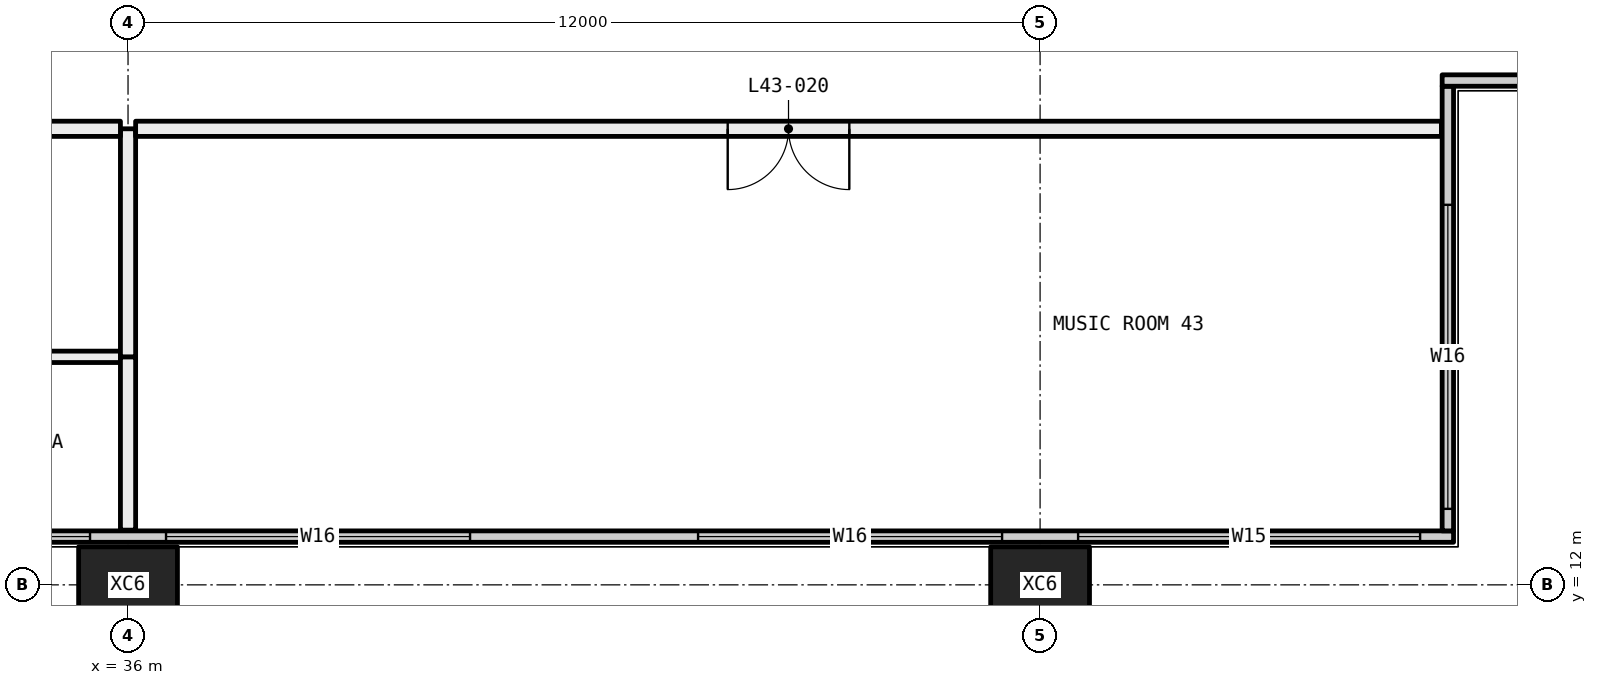
"""IFC4 building model, lengths in metres.
Left out: names, types, materials, properties, quantities, classifications, styles, units other than length and angle.
Written with IfcOpenShell. Run it as: python <this file> out.ifc"""

import sys

from ifc_helpers import new_model, si_unit, direction, frame, frame_2d, origin, origin_2d, place, context, subcontext, project, spatial, rectangle, hollow_rectangle, extrude, element, fill, save


model = new_model("IFC4")
c1 = context("Model", 3, precision=1e-05, world=origin(), true_north=direction((0.0, 1.0)))
c2 = subcontext(c1, "Body", "Model", "MODEL_VIEW")
j1 = project(units=[si_unit("LENGTHUNIT", "METRE"), si_unit("PLANEANGLEUNIT", "RADIAN")], contexts=[c1])
p1 = place(None, origin())
s1 = spatial("IfcSite", under=j1, at=p1, CompositionType="ELEMENT")
p2 = place(p1, origin())
s2 = spatial("IfcBuilding", under=s1, at=p2, CompositionType="ELEMENT")
p3 = place(p2, frame((0.0, 0.0, 165.15)))
s3 = spatial("IfcBuildingStorey", under=s2, at=p3, CompositionType="ELEMENT", Elevation=165.15)
for number, where, z_axis, x_axis in (
    (1, (36.0, 12.0, -0.4), (0.0, 0.0, 1.0), (1.0, 0.0, 0.0)),
    (2, (48.0, 12.0, -0.4), (0.0, 0.0, 1.0), (1.0, 0.0, 0.0)),
):
    element("IfcColumn", number, at=place(p3, frame(where, z_axis=z_axis, x_axis=x_axis)), inside=s3, PredefinedType="COLUMN", context=c2, shape_type="SweptSolid", body=[
        extrude(hollow_rectangle(XDim=1.3, YDim=1.0, WallThickness=0.05, at=origin_2d()), origin(), (0.0, 0.0, 1.0), 3.45),
    ])
p4 = place(p3, frame((6.56, 12.635, 0.0), z_axis=(0.0, 0.0, 1.0), x_axis=(1.0, 0.0, 0.0)))
e3 = element("IfcWall", 3, at=p4, inside=s3, PredefinedType="ELEMENTEDWALL", context=c2, shape_type="SweptSolid", body=[
    extrude(rectangle(XDim=46.88, YDim=0.15, at=frame_2d((23.44, 0.0))), origin(), (0.0, 0.0, 1.0), 3.05),
])
p5 = place(p4, frame((0.44, 0.0, 0.45)))
e4 = element("IfcOpeningElement", 4, at=p5, cuts=e3, PredefinedType="OPENING", context=c2, shape_type="SweptSolid", body=[
    extrude(rectangle(XDim=4.5, YDim=2.55, at=frame_2d((2.25, 1.275))), frame((0.0, 0.085, 0.0), z_axis=(0.0, -1.0, 0.0), x_axis=(1.0, 0.0, 0.0)), (0.0, 0.0, 1.0), 0.17),
])
p6 = place(p4, frame((5.94, 0.0, 0.45)))
e5 = element("IfcOpeningElement", 5, at=p6, cuts=e3, PredefinedType="OPENING", context=c2, shape_type="SweptSolid", body=[
    extrude(rectangle(XDim=4.0, YDim=2.55, at=frame_2d((2.0, 1.275))), frame((0.0, 0.085, 0.0), z_axis=(0.0, -1.0, 0.0), x_axis=(1.0, 0.0, 0.0)), (0.0, 0.0, 1.0), 0.17),
])
p7 = place(p4, frame((12.94, 0.0, 0.45)))
e6 = element("IfcOpeningElement", 6, at=p7, cuts=e3, PredefinedType="OPENING", context=c2, shape_type="SweptSolid", body=[
    extrude(rectangle(XDim=4.0, YDim=2.55, at=frame_2d((2.0, 1.275))), frame((0.0, 0.085, 0.0), z_axis=(0.0, -1.0, 0.0), x_axis=(1.0, 0.0, 0.0)), (0.0, 0.0, 1.0), 0.17),
])
p8 = place(p4, frame((17.94, 0.0, 0.45)))
e7 = element("IfcOpeningElement", 7, at=p8, cuts=e3, PredefinedType="OPENING", context=c2, shape_type="SweptSolid", body=[
    extrude(rectangle(XDim=4.0, YDim=2.55, at=frame_2d((2.0, 1.275))), frame((0.0, 0.085, 0.0), z_axis=(0.0, -1.0, 0.0), x_axis=(1.0, 0.0, 0.0)), (0.0, 0.0, 1.0), 0.17),
])
p9 = place(p4, frame((24.94, 0.0, 0.45)))
e8 = element("IfcOpeningElement", 8, at=p9, cuts=e3, PredefinedType="OPENING", context=c2, shape_type="SweptSolid", body=[
    extrude(rectangle(XDim=1.0, YDim=2.55, at=frame_2d((0.5, 1.275))), frame((0.0, 0.085, 0.0), z_axis=(0.0, -1.0, 0.0), x_axis=(1.0, 0.0, 0.0)), (0.0, 0.0, 1.0), 0.17),
])
p10 = place(p4, frame((26.94, 0.0, 0.45)))
e9 = element("IfcOpeningElement", 9, at=p10, cuts=e3, PredefinedType="OPENING", context=c2, shape_type="SweptSolid", body=[
    extrude(rectangle(XDim=2.0, YDim=2.55, at=frame_2d((1.0, 1.275))), frame((0.0, 0.085, 0.0), z_axis=(0.0, -1.0, 0.0), x_axis=(1.0, 0.0, 0.0)), (0.0, 0.0, 1.0), 0.17),
])
p11 = place(p4, frame((29.94, 0.0, 0.45)))
e10 = element("IfcOpeningElement", 10, at=p11, cuts=e3, PredefinedType="OPENING", context=c2, shape_type="SweptSolid", body=[
    extrude(rectangle(XDim=4.0, YDim=2.55, at=frame_2d((2.0, 1.275))), frame((0.0, 0.085, 0.0), z_axis=(0.0, -1.0, 0.0), x_axis=(1.0, 0.0, 0.0)), (0.0, 0.0, 1.0), 0.17),
])
p12 = place(p4, frame((36.94, 0.0, 0.45)))
e11 = element("IfcOpeningElement", 11, at=p12, cuts=e3, PredefinedType="OPENING", context=c2, shape_type="SweptSolid", body=[
    extrude(rectangle(XDim=4.0, YDim=2.55, at=frame_2d((2.0, 1.275))), frame((0.0, 0.085, 0.0), z_axis=(0.0, -1.0, 0.0), x_axis=(1.0, 0.0, 0.0)), (0.0, 0.0, 1.0), 0.17),
])
p13 = place(p4, frame((41.94, 0.0, 0.45)))
e12 = element("IfcOpeningElement", 12, at=p13, cuts=e3, PredefinedType="OPENING", context=c2, shape_type="SweptSolid", body=[
    extrude(rectangle(XDim=4.5, YDim=2.55, at=frame_2d((2.25, 1.275))), frame((0.0, 0.085, 0.0), z_axis=(0.0, -1.0, 0.0), x_axis=(1.0, 0.0, 0.0)), (0.0, 0.0, 1.0), 0.17),
])
p14 = place(p3, frame((53.365, 12.71, 0.0), z_axis=(0.0, 0.0, 1.0), x_axis=(0.0, 1.0, 0.0)))
e13 = element("IfcWall", 13, at=p14, inside=s3, PredefinedType="ELEMENTEDWALL", context=c2, shape_type="SweptSolid", body=[
    extrude(rectangle(XDim=5.85, YDim=0.15, at=frame_2d((2.925, 0.0))), origin(), (0.0, 0.0, 1.0), 3.05),
])
p15 = place(p14, frame((0.29, 0.0, 0.45)))
e14 = element("IfcOpeningElement", 14, at=p15, cuts=e13, PredefinedType="OPENING", context=c2, shape_type="SweptSolid", body=[
    extrude(rectangle(XDim=4.0, YDim=2.55, at=frame_2d((2.0, 1.275))), frame((0.0, 0.085, 0.0), z_axis=(0.0, -1.0, 0.0), x_axis=(1.0, 0.0, 0.0)), (0.0, 0.0, 1.0), 0.17),
])
p16 = place(p3, frame((53.29, 18.635, 0.0), z_axis=(0.0, 0.0, 1.0), x_axis=(1.0, 0.0, 0.0)))
e15 = element("IfcWall", 15, at=p16, inside=s3, PredefinedType="ELEMENTEDWALL", context=c2, shape_type="SweptSolid", body=[
    extrude(rectangle(XDim=6.15, YDim=0.15, at=frame_2d((3.075, 0.0))), origin(), (0.0, 0.0, 1.0), 3.05),
])
p17 = place(p16, frame((1.71, 0.0, 0.45)))
e16 = element("IfcOpeningElement", 16, at=p17, cuts=e15, PredefinedType="OPENING", context=c2, shape_type="SweptSolid", body=[
    extrude(rectangle(XDim=4.0, YDim=2.55, at=frame_2d((2.0, 1.275))), frame((0.0, 0.085, 0.0), z_axis=(0.0, -1.0, 0.0), x_axis=(1.0, 0.0, 0.0)), (0.0, 0.0, 1.0), 0.17),
])
p18 = place(p3, frame((35.9, 15.0, 0.0), z_axis=(0.0, 0.0, 1.0), x_axis=(-1.0, 0.0, 0.0)))
e17 = element("IfcWall", 17, at=p18, inside=s3, PredefinedType="PARTITIONING", context=c2, shape_type="SweptSolid", body=[
    extrude(rectangle(XDim=5.825, YDim=0.15, at=frame_2d((2.913, 0.0))), origin(), (0.0, 0.0, 1.0), 3.05),
])
p19 = place(p3, frame((36.0, 12.72, 0.0), z_axis=(0.0, 0.0, 1.0), x_axis=(0.0, 1.0, 0.0)))
e18 = element("IfcWall", 18, at=p19, inside=s3, PredefinedType="PARTITIONING", context=c2, shape_type="SweptSolid", body=[
    extrude(rectangle(XDim=2.28, YDim=0.2, at=frame_2d((1.14, 0.0))), origin(), (0.0, 0.0, 1.0), 2.45),
])
p20 = place(p3, frame((36.0, 15.0, 0.0), z_axis=(0.0, 0.0, 1.0), x_axis=(0.0, 1.0, 0.0)))
e19 = element("IfcWall", 19, at=p20, inside=s3, PredefinedType="PARTITIONING", context=c2, shape_type="SweptSolid", body=[
    extrude(rectangle(XDim=3.0, YDim=0.2, at=frame_2d((1.5, 0.0))), origin(), (0.0, 0.0, 1.0), 2.45),
])
p21 = place(p3, frame((35.9, 18.0, 0.0), z_axis=(0.0, 0.0, 1.0), x_axis=(-1.0, 0.0, 0.0)))
e20 = element("IfcWall", 20, at=p21, inside=s3, PredefinedType="PARTITIONING", context=c2, shape_type="SweptSolid", body=[
    extrude(rectangle(XDim=5.9, YDim=0.2, at=frame_2d((2.95, 0.0))), origin(), (0.0, 0.0, 1.0), 3.05),
])
p22 = place(p3, frame((53.28, 18.0, 0.0), z_axis=(0.0, 0.0, 1.0), x_axis=(-1.0, 0.0, 0.0)))
e21 = element("IfcWall", 21, at=p22, inside=s3, PredefinedType="PARTITIONING", context=c2, shape_type="SweptSolid", body=[
    extrude(rectangle(XDim=17.18, YDim=0.2, at=frame_2d((8.59, 0.0))), origin(), (0.0, 0.0, 1.0), 3.05),
])
p23 = place(p22, frame((7.79, 0.0, 0.0)))
e22 = element("IfcOpeningElement", 22, at=p23, cuts=e21, PredefinedType="OPENING", context=c2, shape_type="SweptSolid", body=[
    extrude(rectangle(XDim=1.6, YDim=2.1, at=frame_2d((0.8, 1.05))), frame((0.0, 0.11, 0.0), z_axis=(0.0, -1.0, 0.0), x_axis=(1.0, 0.0, 0.0)), (0.0, 0.0, 1.0), 0.22),
])
p24 = place(p10, origin())
e23 = element("IfcWindow", 23, at=p24, inside=s3, PartitioningType="SINGLE_PANEL", PredefinedType="WINDOW", context=c2, shape_type="SweptSolid", body=[
    extrude(rectangle(XDim=2.0, YDim=2.55, at=frame_2d((1.0, 1.275))), frame((0.0, 0.03, 0.0), z_axis=(0.0, -1.0, 0.0), x_axis=(1.0, 0.0, 0.0)), (0.0, 0.0, 1.0), 0.06),
])
fill(e9, e23)
p25 = place(p11, origin())
e24 = element("IfcWindow", 24, at=p25, inside=s3, PartitioningType="SINGLE_PANEL", PredefinedType="WINDOW", context=c2, shape_type="SweptSolid", body=[
    extrude(rectangle(XDim=4.0, YDim=2.55, at=frame_2d((2.0, 1.275))), frame((0.0, 0.03, 0.0), z_axis=(0.0, -1.0, 0.0), x_axis=(1.0, 0.0, 0.0)), (0.0, 0.0, 1.0), 0.06),
])
fill(e10, e24)
p26 = place(p12, origin())
e25 = element("IfcWindow", 25, at=p26, inside=s3, PartitioningType="SINGLE_PANEL", PredefinedType="WINDOW", context=c2, shape_type="SweptSolid", body=[
    extrude(rectangle(XDim=4.0, YDim=2.55, at=frame_2d((2.0, 1.275))), frame((0.0, 0.03, 0.0), z_axis=(0.0, -1.0, 0.0), x_axis=(1.0, 0.0, 0.0)), (0.0, 0.0, 1.0), 0.06),
])
fill(e11, e25)
p27 = place(p13, origin())
e26 = element("IfcWindow", 26, at=p27, inside=s3, PartitioningType="SINGLE_PANEL", PredefinedType="WINDOW", context=c2, shape_type="SweptSolid", body=[
    extrude(rectangle(XDim=4.5, YDim=2.55, at=frame_2d((2.25, 1.275))), frame((0.0, 0.03, 0.0), z_axis=(0.0, -1.0, 0.0), x_axis=(1.0, 0.0, 0.0)), (0.0, 0.0, 1.0), 0.06),
])
fill(e12, e26)
p28 = place(p15, origin())
e27 = element("IfcWindow", 27, at=p28, inside=s3, PartitioningType="SINGLE_PANEL", PredefinedType="WINDOW", context=c2, shape_type="SweptSolid", body=[
    extrude(rectangle(XDim=4.0, YDim=2.55, at=frame_2d((2.0, 1.275))), frame((0.0, 0.03, 0.0), z_axis=(0.0, -1.0, 0.0), x_axis=(1.0, 0.0, 0.0)), (0.0, 0.0, 1.0), 0.06),
])
fill(e14, e27)
p29 = place(p23, origin())
e28 = element("IfcDoor", 28, at=p29, inside=s3, OperationType="DOUBLE_DOOR_SINGLE_SWING", PredefinedType="DOOR", context=c2, shape_type="SweptSolid", body=[
    extrude(rectangle(XDim=1.6, YDim=2.1, at=frame_2d((0.8, 1.05))), frame((0.0, 0.025, 0.0), z_axis=(0.0, -1.0, 0.0), x_axis=(1.0, 0.0, 0.0)), (0.0, 0.0, 1.0), 0.05),
])
fill(e22, e28)
save(model, sys.argv[1])
